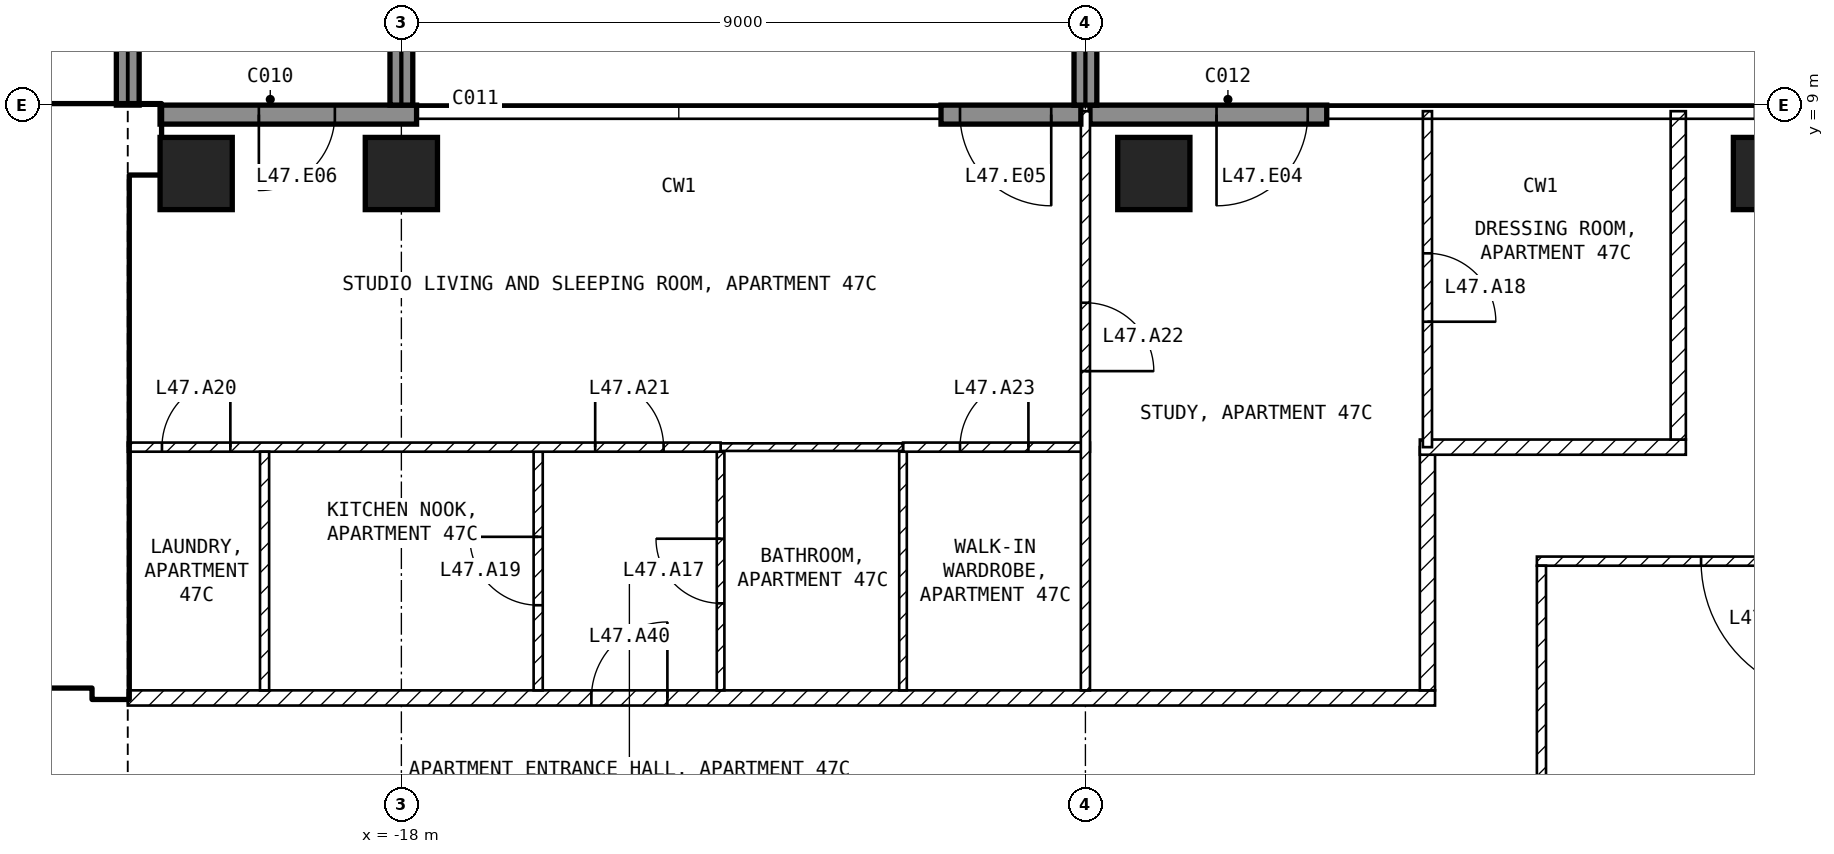
"""IFC4 building model, lengths in metres.
Left out: names, types, materials, properties, quantities, classifications, styles, units other than length and angle.
Written with IfcOpenShell. Run it as: python <this file> out.ifc"""

import sys

from ifc_helpers import new_model, si_unit, direction, frame, frame_2d, origin, origin_2d, place, context, subcontext, project, spatial, rectangle, extrude, element, fill, save


model = new_model("IFC4")
c1 = context("Model", 3, precision=1e-05, world=origin(), true_north=direction((0.0, 1.0)))
c2 = subcontext(c1, "Body", "Model", "MODEL_VIEW")
j1 = project(units=[si_unit("LENGTHUNIT", "METRE"), si_unit("PLANEANGLEUNIT", "RADIAN")], contexts=[c1])
p1 = place(None, origin())
s1 = spatial("IfcSite", under=j1, at=p1, CompositionType="ELEMENT")
p2 = place(p1, origin())
s2 = spatial("IfcBuilding", under=s1, at=p2, CompositionType="ELEMENT")
p3 = place(p2, frame((0.0, 0.0, 191.1)))
s3 = spatial("IfcBuildingStorey", under=s2, at=p3, CompositionType="ELEMENT", Elevation=191.1)
for number, where, z_axis, x_axis in (
    (1, (-20.7, 8.1, -0.25), (0.0, 0.0, 1.0), (1.0, 0.0, 0.0)),
    (2, (-18.0, 8.1, -0.25), (0.0, 0.0, 1.0), (1.0, 0.0, 0.0)),
    (3, (-8.1, 8.1, -0.25), (0.0, 0.0, 1.0), (1.0, 0.0, 0.0)),
    (4, (0.0, 8.1, -0.25), (0.0, 0.0, 1.0), (1.0, 0.0, 0.0)),
):
    element("IfcColumn", number, at=place(p3, frame(where, z_axis=z_axis, x_axis=x_axis)), inside=s3, PredefinedType="COLUMN", context=c2, shape_type="SweptSolid", body=[
        extrude(rectangle(XDim=0.95, YDim=0.95, at=origin_2d()), origin(), (0.0, 0.0, 1.0), 3.5),
    ])
p4 = place(p3, frame((-5.825, 8.875, 0.0), z_axis=(0.0, 0.0, 1.0), x_axis=(-1.0, 0.0, 0.0)))
e5 = element("IfcWall", 5, at=p4, inside=s3, PredefinedType="SOLIDWALL", context=c2, shape_type="SweptSolid", body=[
    extrude(rectangle(XDim=3.115, YDim=0.25, at=frame_2d((1.558, 0.0))), origin(), (0.0, 0.0, 1.0), 3.25),
])
p5 = place(p4, frame((0.25, 0.0, 0.0)))
e6 = element("IfcOpeningElement", 6, at=p5, cuts=e5, PredefinedType="OPENING", context=c2, shape_type="SweptSolid", body=[
    extrude(rectangle(XDim=1.2, YDim=2.4, at=frame_2d((0.6, 1.2))), frame((0.0, 0.135, 0.0), z_axis=(0.0, -1.0, 0.0), x_axis=(1.0, 0.0, 0.0)), (0.0, 0.0, 1.0), 0.27),
])
p6 = place(p3, frame((-9.06, 8.875, 0.0), z_axis=(0.0, 0.0, 1.0), x_axis=(-1.0, 0.0, 0.0)))
e7 = element("IfcWall", 7, at=p6, inside=s3, PredefinedType="SOLIDWALL", context=c2, shape_type="SweptSolid", body=[
    extrude(rectangle(XDim=1.84, YDim=0.25, at=frame_2d((0.92, 0.0))), origin(), (0.0, 0.0, 1.0), 3.25),
])
p7 = place(p6, frame((0.39, 0.0, 0.0)))
e8 = element("IfcOpeningElement", 8, at=p7, cuts=e7, PredefinedType="OPENING", context=c2, shape_type="SweptSolid", body=[
    extrude(rectangle(XDim=1.2, YDim=2.4, at=frame_2d((0.6, 1.2))), frame((0.0, 0.135, 0.0), z_axis=(0.0, -1.0, 0.0), x_axis=(1.0, 0.0, 0.0)), (0.0, 0.0, 1.0), 0.27),
])
p8 = place(p3, frame((-17.8, 8.875, 0.0), z_axis=(0.0, 0.0, 1.0), x_axis=(-1.0, 0.0, 0.0)))
e9 = element("IfcWall", 9, at=p8, inside=s3, PredefinedType="SOLIDWALL", context=c2, shape_type="SweptSolid", body=[
    extrude(rectangle(XDim=3.375, YDim=0.25, at=frame_2d((1.688, 0.0))), origin(), (0.0, 0.0, 1.0), 3.25),
])
p9 = place(p8, frame((1.075, 0.0, 0.0)))
e10 = element("IfcOpeningElement", 10, at=p9, cuts=e9, PredefinedType="OPENING", context=c2, shape_type="SweptSolid", body=[
    extrude(rectangle(XDim=1.0, YDim=2.4, at=frame_2d((0.5, 1.2))), frame((0.0, 0.135, 0.0), z_axis=(0.0, -1.0, 0.0), x_axis=(1.0, 0.0, 0.0)), (0.0, 0.0, 1.0), 0.27),
])
for number, where, z_axis, x_axis in (
    (11, (-21.6, 9.0, 0.0), (0.0, 0.0, 1.0), (0.0, 1.0, 0.0)),
    (12, (-18.0, 9.0, 0.0), (0.0, 0.0, 1.0), (0.0, 1.0, 0.0)),
    (13, (-9.0, 9.0, 0.0), (0.0, 0.0, 1.0), (0.0, 1.0, 0.0)),
):
    element("IfcWall", number, at=place(p3, frame(where, z_axis=z_axis, x_axis=x_axis)), inside=s3, PredefinedType="SOLIDWALL", context=c2, shape_type="SweptSolid", body=[
        extrude(rectangle(XDim=2.7, YDim=0.3, at=frame_2d((1.35, 0.0))), origin(), (0.0, 0.0, 1.0), 3.25),
    ])
p10 = place(p3, frame((-29.6, 8.55, 0.0), z_axis=(0.0, 0.0, 1.0), x_axis=(1.0, 0.0, 0.0)))
e14 = element("IfcWall", 14, at=p10, inside=s3, PredefinedType="SHEAR", context=c2, shape_type="SweptSolid", body=[
    extrude(rectangle(XDim=8.425, YDim=0.9, at=frame_2d((4.212, 0.0))), origin(), (0.0, 0.0, 1.0), 3.25),
])
p11 = place(p3, frame((-21.825, 1.2, 0.0), z_axis=(0.0, 0.0, 1.0), x_axis=(0.0, 1.0, 0.0)))
e15 = element("IfcWall", 15, at=p11, inside=s3, PredefinedType="SHEAR", context=c2, shape_type="SweptSolid", body=[
    extrude(rectangle(XDim=6.9, YDim=0.45, at=frame_2d((3.45, 0.0))), origin(), (0.0, 0.0, 1.0), 3.25),
])
p12 = place(p3, frame((-33.2, 1.45, 0.0), z_axis=(0.0, 0.0, 1.0), x_axis=(1.0, 0.0, 0.0)))
e16 = element("IfcWall", 16, at=p12, inside=s3, PredefinedType="SOLIDWALL", context=c2, shape_type="SweptSolid", body=[
    extrude(rectangle(XDim=11.15, YDim=0.2, at=frame_2d((5.575, 0.0))), origin(), (0.0, 0.0, 1.0), 3.25),
])
p13 = place(p12, frame((9.4, 0.0, 0.0)))
e17 = element("IfcOpeningElement", 17, at=p13, cuts=e16, PredefinedType="OPENING", context=c2, shape_type="SweptSolid", body=[
    extrude(rectangle(XDim=1.0, YDim=2.1, at=frame_2d((0.5, 1.05))), frame((0.0, 0.11, 0.0), z_axis=(0.0, -1.0, 0.0), x_axis=(1.0, 0.0, 0.0)), (0.0, 0.0, 1.0), 0.22),
])
p14 = place(p12, frame((6.9, 0.0, 0.0)))
e18 = element("IfcOpeningElement", 18, at=p14, cuts=e16, PredefinedType="OPENING", context=c2, shape_type="SweptSolid", body=[
    extrude(rectangle(XDim=1.0, YDim=2.1, at=frame_2d((0.5, 1.05))), frame((0.0, 0.11, 0.0), z_axis=(0.0, -1.0, 0.0), x_axis=(1.0, 0.0, 0.0)), (0.0, 0.0, 1.0), 0.22),
])
p15 = place(p12, frame((1.1, 0.0, 0.0)))
e19 = element("IfcOpeningElement", 19, at=p15, cuts=e16, PredefinedType="OPENING", context=c2, shape_type="SweptSolid", body=[
    extrude(rectangle(XDim=0.9, YDim=2.1, at=frame_2d((0.45, 1.05))), frame((0.0, 0.11, 0.0), z_axis=(0.0, -1.0, 0.0), x_axis=(1.0, 0.0, 0.0)), (0.0, 0.0, 1.0), 0.22),
])
p16 = place(p3, frame((-28.35, 5.15, 0.0), z_axis=(0.0, 0.0, 1.0), x_axis=(1.0, 0.0, 0.0)))
e20 = element("IfcWall", 20, at=p16, inside=s3, PredefinedType="SOLIDWALL", context=c2, shape_type="SweptSolid", body=[
    extrude(rectangle(XDim=6.3, YDim=0.2, at=frame_2d((3.15, 0.0))), origin(), (0.0, 0.0, 1.0), 3.25),
])
p17 = place(p16, frame((5.1, 0.0, 0.0)))
e21 = element("IfcOpeningElement", 21, at=p17, cuts=e20, PredefinedType="OPENING", context=c2, shape_type="SweptSolid", body=[
    extrude(rectangle(XDim=1.0, YDim=2.1, at=frame_2d((0.5, 1.05))), frame((0.0, 0.11, 0.0), z_axis=(0.0, -1.0, 0.0), x_axis=(1.0, 0.0, 0.0)), (0.0, 0.0, 1.0), 0.22),
])
p18 = place(p3, frame((3.06, 3.0, 0.0), z_axis=(0.0, 0.0, 1.0), x_axis=(-1.0, 0.0, 0.0)))
e22 = element("IfcWall", 22, at=p18, inside=s3, PredefinedType="PARTITIONING", context=c2, shape_type="SweptSolid", body=[
    extrude(rectangle(XDim=6.12, YDim=0.12, at=frame_2d((3.06, 0.0))), origin(), (0.0, 0.0, 1.0), 3.25),
])
p19 = place(p18, frame((2.16, 0.0, 0.0)))
e23 = element("IfcOpeningElement", 23, at=p19, cuts=e22, PredefinedType="OPENING", context=c2, shape_type="SweptSolid", body=[
    extrude(rectangle(XDim=1.8, YDim=2.1, at=frame_2d((0.9, 1.05))), frame((0.0, 0.07, 0.0), z_axis=(0.0, -1.0, 0.0), x_axis=(1.0, 0.0, 0.0)), (0.0, 0.0, 1.0), 0.14),
])
p20 = place(p3, frame((-3.0, 2.94, 0.0), z_axis=(0.0, 0.0, 1.0), x_axis=(0.0, -1.0, 0.0)))
e24 = element("IfcWall", 24, at=p20, inside=s3, PredefinedType="PARTITIONING", context=c2, shape_type="SweptSolid", body=[
    extrude(rectangle(XDim=5.88, YDim=0.12, at=frame_2d((2.94, 0.0))), origin(), (0.0, 0.0, 1.0), 3.25),
])
p21 = place(p3, frame((-21.6, 1.2, 0.0), z_axis=(0.0, 0.0, 1.0), x_axis=(1.0, 0.0, 0.0)))
e25 = element("IfcWall", 25, at=p21, inside=s3, PredefinedType="PARTITIONING", context=c2, shape_type="SweptSolid", body=[
    extrude(rectangle(XDim=17.2, YDim=0.2, at=frame_2d((8.6, 0.0))), origin(), (0.0, 0.0, 1.0), 3.25),
])
p22 = place(p21, frame((6.1, 0.0, 0.0)))
e26 = element("IfcOpeningElement", 26, at=p22, cuts=e25, PredefinedType="OPENING", context=c2, shape_type="SweptSolid", body=[
    extrude(rectangle(XDim=1.0, YDim=2.1, at=frame_2d((0.5, 1.05))), frame((0.0, 0.11, 0.0), z_axis=(0.0, -1.0, 0.0), x_axis=(1.0, 0.0, 0.0)), (0.0, 0.0, 1.0), 0.22),
])
p23 = place(p3, frame((-4.5, 1.3, 0.0), z_axis=(0.0, 0.0, 1.0), x_axis=(0.0, 1.0, 0.0)))
e27 = element("IfcWall", 27, at=p23, inside=s3, PredefinedType="PARTITIONING", context=c2, shape_type="SweptSolid", body=[
    extrude(rectangle(XDim=3.2, YDim=0.2, at=frame_2d((1.6, 0.0))), origin(), (0.0, 0.0, 1.0), 3.25),
])
p24 = place(p3, frame((-4.6, 4.5, 0.0), z_axis=(0.0, 0.0, 1.0), x_axis=(1.0, 0.0, 0.0)))
e28 = element("IfcWall", 28, at=p24, inside=s3, PredefinedType="PARTITIONING", context=c2, shape_type="SweptSolid", body=[
    extrude(rectangle(XDim=3.5, YDim=0.2, at=frame_2d((1.75, 0.0))), origin(), (0.0, 0.0, 1.0), 3.25),
])
p25 = place(p3, frame((-1.2, 4.6, 0.0), z_axis=(0.0, 0.0, 1.0), x_axis=(0.0, 1.0, 0.0)))
e29 = element("IfcWall", 29, at=p25, inside=s3, PredefinedType="PARTITIONING", context=c2, shape_type="SweptSolid", body=[
    extrude(rectangle(XDim=4.32, YDim=0.2, at=frame_2d((2.16, 0.0))), origin(), (0.0, 0.0, 1.0), 3.25),
])
p26 = place(p3, frame((-11.4, 1.3, 0.0), z_axis=(0.0, 0.0, 1.0), x_axis=(0.0, 1.0, 0.0)))
e30 = element("IfcWall", 30, at=p26, inside=s3, PredefinedType="PARTITIONING", context=c2, shape_type="SweptSolid", body=[
    extrude(rectangle(XDim=3.14, YDim=0.1, at=frame_2d((1.57, 0.0))), origin(), (0.0, 0.0, 1.0), 3.25),
])
p27 = place(p3, frame((-11.4, 4.5, 0.0), z_axis=(0.0, 0.0, 1.0), x_axis=(1.0, 0.0, 0.0)))
e31 = element("IfcWall", 31, at=p27, inside=s3, PredefinedType="PARTITIONING", context=c2, shape_type="SweptSolid", body=[
    extrude(rectangle(XDim=2.46, YDim=0.12, at=frame_2d((1.23, 0.0))), origin(), (0.0, 0.0, 1.0), 3.25),
])
p28 = place(p27, frame((0.75, 0.0, 0.0)))
e32 = element("IfcOpeningElement", 32, at=p28, cuts=e31, PredefinedType="OPENING", context=c2, shape_type="SweptSolid", body=[
    extrude(rectangle(XDim=0.9, YDim=2.1, at=frame_2d((0.45, 1.05))), frame((0.0, 0.07, 0.0), z_axis=(0.0, -1.0, 0.0), x_axis=(1.0, 0.0, 0.0)), (0.0, 0.0, 1.0), 0.14),
])
p29 = place(p3, frame((-9.0, 8.92, 0.0), z_axis=(0.0, 0.0, 1.0), x_axis=(0.0, -1.0, 0.0)))
e33 = element("IfcWall", 33, at=p29, inside=s3, PredefinedType="PARTITIONING", context=c2, shape_type="SweptSolid", body=[
    extrude(rectangle(XDim=7.62, YDim=0.12, at=frame_2d((3.81, 0.0))), origin(), (0.0, 0.0, 1.0), 3.25),
])
p30 = place(p29, frame((2.52, 0.0, 0.0)))
e34 = element("IfcOpeningElement", 34, at=p30, cuts=e33, PredefinedType="OPENING", context=c2, shape_type="SweptSolid", body=[
    extrude(rectangle(XDim=0.9, YDim=2.1, at=frame_2d((0.45, 1.05))), frame((0.0, 0.07, 0.0), z_axis=(0.0, -1.0, 0.0), x_axis=(1.0, 0.0, 0.0)), (0.0, 0.0, 1.0), 0.14),
])
p31 = place(p3, frame((-13.8, 1.3, 0.0), z_axis=(0.0, 0.0, 1.0), x_axis=(0.0, 1.0, 0.0)))
e35 = element("IfcWall", 35, at=p31, inside=s3, PredefinedType="PARTITIONING", context=c2, shape_type="SweptSolid", body=[
    extrude(rectangle(XDim=3.14, YDim=0.1, at=frame_2d((1.57, 0.0))), origin(), (0.0, 0.0, 1.0), 3.25),
])
p32 = place(p31, frame((1.145, 0.0, 0.0)))
e36 = element("IfcOpeningElement", 36, at=p32, cuts=e35, PredefinedType="OPENING", context=c2, shape_type="SweptSolid", body=[
    extrude(rectangle(XDim=0.85, YDim=2.1, at=frame_2d((0.425, 1.05))), frame((0.0, 0.06, 0.0), z_axis=(0.0, -1.0, 0.0), x_axis=(1.0, 0.0, 0.0)), (0.0, 0.0, 1.0), 0.12),
])
p33 = place(p3, frame((-13.8, 4.5, 0.0), z_axis=(0.0, 0.0, 1.0), x_axis=(1.0, 0.0, 0.0)))
e37 = element("IfcWall", 37, at=p33, inside=s3, PredefinedType="PARTITIONING", context=c2, shape_type="SweptSolid", body=[
    extrude(rectangle(XDim=2.4, YDim=0.1, at=frame_2d((1.2, 0.0))), origin(), (0.0, 0.0, 1.0), 3.25),
])
p34 = place(p3, frame((-16.2, 1.3, 0.0), z_axis=(0.0, 0.0, 1.0), x_axis=(0.0, 1.0, 0.0)))
e38 = element("IfcWall", 38, at=p34, inside=s3, PredefinedType="PARTITIONING", context=c2, shape_type="SweptSolid", body=[
    extrude(rectangle(XDim=3.14, YDim=0.12, at=frame_2d((1.57, 0.0))), origin(), (0.0, 0.0, 1.0), 3.25),
])
p35 = place(p34, frame((1.12, 0.0, 0.0)))
e39 = element("IfcOpeningElement", 39, at=p35, cuts=e38, PredefinedType="OPENING", context=c2, shape_type="SweptSolid", body=[
    extrude(rectangle(XDim=0.9, YDim=2.1, at=frame_2d((0.45, 1.05))), frame((0.0, 0.07, 0.0), z_axis=(0.0, -1.0, 0.0), x_axis=(1.0, 0.0, 0.0)), (0.0, 0.0, 1.0), 0.14),
])
p36 = place(p3, frame((-21.6, 4.5, 0.0), z_axis=(0.0, 0.0, 1.0), x_axis=(1.0, 0.0, 0.0)))
e40 = element("IfcWall", 40, at=p36, inside=s3, PredefinedType="PARTITIONING", context=c2, shape_type="SweptSolid", body=[
    extrude(rectangle(XDim=7.8, YDim=0.12, at=frame_2d((3.9, 0.0))), origin(), (0.0, 0.0, 1.0), 3.25),
])
p37 = place(p36, frame((0.45, 0.0, 0.0)))
e41 = element("IfcOpeningElement", 41, at=p37, cuts=e40, PredefinedType="OPENING", context=c2, shape_type="SweptSolid", body=[
    extrude(rectangle(XDim=0.9, YDim=2.1, at=frame_2d((0.45, 1.05))), frame((0.0, 0.07, 0.0), z_axis=(0.0, -1.0, 0.0), x_axis=(1.0, 0.0, 0.0)), (0.0, 0.0, 1.0), 0.14),
])
p38 = place(p36, frame((6.15, 0.0, 0.0)))
e42 = element("IfcOpeningElement", 42, at=p38, cuts=e40, PredefinedType="OPENING", context=c2, shape_type="SweptSolid", body=[
    extrude(rectangle(XDim=0.9, YDim=2.1, at=frame_2d((0.45, 1.05))), frame((0.0, 0.07, 0.0), z_axis=(0.0, -1.0, 0.0), x_axis=(1.0, 0.0, 0.0)), (0.0, 0.0, 1.0), 0.14),
])
p39 = place(p3, frame((-19.8, 1.3, 0.0), z_axis=(0.0, 0.0, 1.0), x_axis=(0.0, 1.0, 0.0)))
e43 = element("IfcWall", 43, at=p39, inside=s3, PredefinedType="PARTITIONING", context=c2, shape_type="SweptSolid", body=[
    extrude(rectangle(XDim=3.14, YDim=0.12, at=frame_2d((1.57, 0.0))), origin(), (0.0, 0.0, 1.0), 3.25),
])
p40 = place(p3, frame((-4.5, 8.92, 0.0), z_axis=(0.0, 0.0, 1.0), x_axis=(0.0, -1.0, 0.0)))
e44 = element("IfcWall", 44, at=p40, inside=s3, PredefinedType="PARTITIONING", context=c2, shape_type="SweptSolid", body=[
    extrude(rectangle(XDim=4.42, YDim=0.12, at=frame_2d((2.21, 0.0))), origin(), (0.0, 0.0, 1.0), 3.25),
])
p41 = place(p40, frame((1.87, 0.0, 0.0)))
e45 = element("IfcOpeningElement", 45, at=p41, cuts=e44, PredefinedType="OPENING", context=c2, shape_type="SweptSolid", body=[
    extrude(rectangle(XDim=0.9, YDim=2.1, at=frame_2d((0.45, 1.05))), frame((0.0, 0.07, 0.0), z_axis=(0.0, -1.0, 0.0), x_axis=(1.0, 0.0, 0.0)), (0.0, 0.0, 1.0), 0.14),
])
p42 = place(p5, origin())
e46 = element("IfcDoor", 46, at=p42, inside=s3, OperationType="SINGLE_SWING_RIGHT", PredefinedType="DOOR", context=c2, shape_type="SweptSolid", body=[
    extrude(rectangle(XDim=1.2, YDim=2.4, at=frame_2d((0.6, 1.2))), frame((0.0, 0.025, 0.0), z_axis=(0.0, -1.0, 0.0), x_axis=(1.0, 0.0, 0.0)), (0.0, 0.0, 1.0), 0.05),
])
fill(e6, e46)
p43 = place(p7, origin())
e47 = element("IfcDoor", 47, at=p43, inside=s3, OperationType="SINGLE_SWING_LEFT", PredefinedType="DOOR", context=c2, shape_type="SweptSolid", body=[
    extrude(rectangle(XDim=1.2, YDim=2.4, at=frame_2d((0.6, 1.2))), frame((0.0, 0.025, 0.0), z_axis=(0.0, -1.0, 0.0), x_axis=(1.0, 0.0, 0.0)), (0.0, 0.0, 1.0), 0.05),
])
fill(e8, e47)
p44 = place(p9, origin())
e48 = element("IfcDoor", 48, at=p44, inside=s3, OperationType="SINGLE_SWING_RIGHT", PredefinedType="DOOR", context=c2, shape_type="SweptSolid", body=[
    extrude(rectangle(XDim=1.0, YDim=2.4, at=frame_2d((0.5, 1.2))), frame((0.0, 0.025, 0.0), z_axis=(0.0, -1.0, 0.0), x_axis=(1.0, 0.0, 0.0)), (0.0, 0.0, 1.0), 0.05),
])
fill(e10, e48)
p45 = place(p17, origin())
e49 = element("IfcDoor", 49, at=p45, inside=s3, OperationType="SINGLE_SWING_LEFT", PredefinedType="DOOR", context=c2, shape_type="SweptSolid", body=[
    extrude(rectangle(XDim=1.0, YDim=2.1, at=frame_2d((0.5, 1.05))), frame((0.0, 0.025, 0.0), z_axis=(0.0, -1.0, 0.0), x_axis=(1.0, 0.0, 0.0)), (0.0, 0.0, 1.0), 0.05),
])
fill(e21, e49)
p46 = place(p19, origin())
e50 = element("IfcDoor", 50, at=p46, inside=s3, OperationType="SINGLE_SWING_LEFT", PredefinedType="DOOR", context=c2, shape_type="SweptSolid", body=[
    extrude(rectangle(XDim=1.8, YDim=2.1, at=frame_2d((0.9, 1.05))), frame((0.0, 0.025, 0.0), z_axis=(0.0, -1.0, 0.0), x_axis=(1.0, 0.0, 0.0)), (0.0, 0.0, 1.0), 0.05),
])
fill(e23, e50)
p47 = place(p32, origin())
e51 = element("IfcDoor", 51, at=p47, inside=s3, OperationType="SINGLE_SWING_RIGHT", PredefinedType="DOOR", context=c2, shape_type="SweptSolid", body=[
    extrude(rectangle(XDim=0.85, YDim=2.1, at=frame_2d((0.425, 1.05))), frame((0.0, 0.025, 0.0), z_axis=(0.0, -1.0, 0.0), x_axis=(1.0, 0.0, 0.0)), (0.0, 0.0, 1.0), 0.05),
])
fill(e36, e51)
p48 = place(p41, origin())
e52 = element("IfcDoor", 52, at=p48, inside=s3, OperationType="SINGLE_SWING_RIGHT", PredefinedType="DOOR", context=c2, shape_type="SweptSolid", body=[
    extrude(rectangle(XDim=0.9, YDim=2.1, at=frame_2d((0.45, 1.05))), frame((0.0, 0.025, 0.0), z_axis=(0.0, -1.0, 0.0), x_axis=(1.0, 0.0, 0.0)), (0.0, 0.0, 1.0), 0.05),
])
fill(e45, e52)
p49 = place(p35, origin())
e53 = element("IfcDoor", 53, at=p49, inside=s3, OperationType="SINGLE_SWING_RIGHT", PredefinedType="DOOR", context=c2, shape_type="SweptSolid", body=[
    extrude(rectangle(XDim=0.9, YDim=2.1, at=frame_2d((0.45, 1.05))), frame((0.0, 0.025, 0.0), z_axis=(0.0, -1.0, 0.0), x_axis=(1.0, 0.0, 0.0)), (0.0, 0.0, 1.0), 0.05),
])
fill(e39, e53)
p50 = place(p37, origin())
e54 = element("IfcDoor", 54, at=p50, inside=s3, OperationType="SINGLE_SWING_RIGHT", PredefinedType="DOOR", context=c2, shape_type="SweptSolid", body=[
    extrude(rectangle(XDim=0.9, YDim=2.1, at=frame_2d((0.45, 1.05))), frame((0.0, 0.025, 0.0), z_axis=(0.0, -1.0, 0.0), x_axis=(1.0, 0.0, 0.0)), (0.0, 0.0, 1.0), 0.05),
])
fill(e41, e54)
p51 = place(p38, origin())
e55 = element("IfcDoor", 55, at=p51, inside=s3, OperationType="SINGLE_SWING_LEFT", PredefinedType="DOOR", context=c2, shape_type="SweptSolid", body=[
    extrude(rectangle(XDim=0.9, YDim=2.1, at=frame_2d((0.45, 1.05))), frame((0.0, 0.025, 0.0), z_axis=(0.0, -1.0, 0.0), x_axis=(1.0, 0.0, 0.0)), (0.0, 0.0, 1.0), 0.05),
])
fill(e42, e55)
p52 = place(p30, origin())
e56 = element("IfcDoor", 56, at=p52, inside=s3, OperationType="SINGLE_SWING_RIGHT", PredefinedType="DOOR", context=c2, shape_type="SweptSolid", body=[
    extrude(rectangle(XDim=0.9, YDim=2.1, at=frame_2d((0.45, 1.05))), frame((0.0, 0.025, 0.0), z_axis=(0.0, -1.0, 0.0), x_axis=(1.0, 0.0, 0.0)), (0.0, 0.0, 1.0), 0.05),
])
fill(e34, e56)
p53 = place(p28, origin())
e57 = element("IfcDoor", 57, at=p53, inside=s3, OperationType="SINGLE_SWING_RIGHT", PredefinedType="DOOR", context=c2, shape_type="SweptSolid", body=[
    extrude(rectangle(XDim=0.9, YDim=2.1, at=frame_2d((0.45, 1.05))), frame((0.0, 0.025, 0.0), z_axis=(0.0, -1.0, 0.0), x_axis=(1.0, 0.0, 0.0)), (0.0, 0.0, 1.0), 0.05),
])
fill(e32, e57)
p54 = place(p22, origin())
e58 = element("IfcDoor", 58, at=p54, inside=s3, OperationType="SINGLE_SWING_RIGHT", PredefinedType="DOOR", context=c2, shape_type="SweptSolid", body=[
    extrude(rectangle(XDim=1.0, YDim=2.1, at=frame_2d((0.5, 1.05))), frame((0.0, 0.025, 0.0), z_axis=(0.0, -1.0, 0.0), x_axis=(1.0, 0.0, 0.0)), (0.0, 0.0, 1.0), 0.05),
])
fill(e26, e58)
save(model, sys.argv[1])
